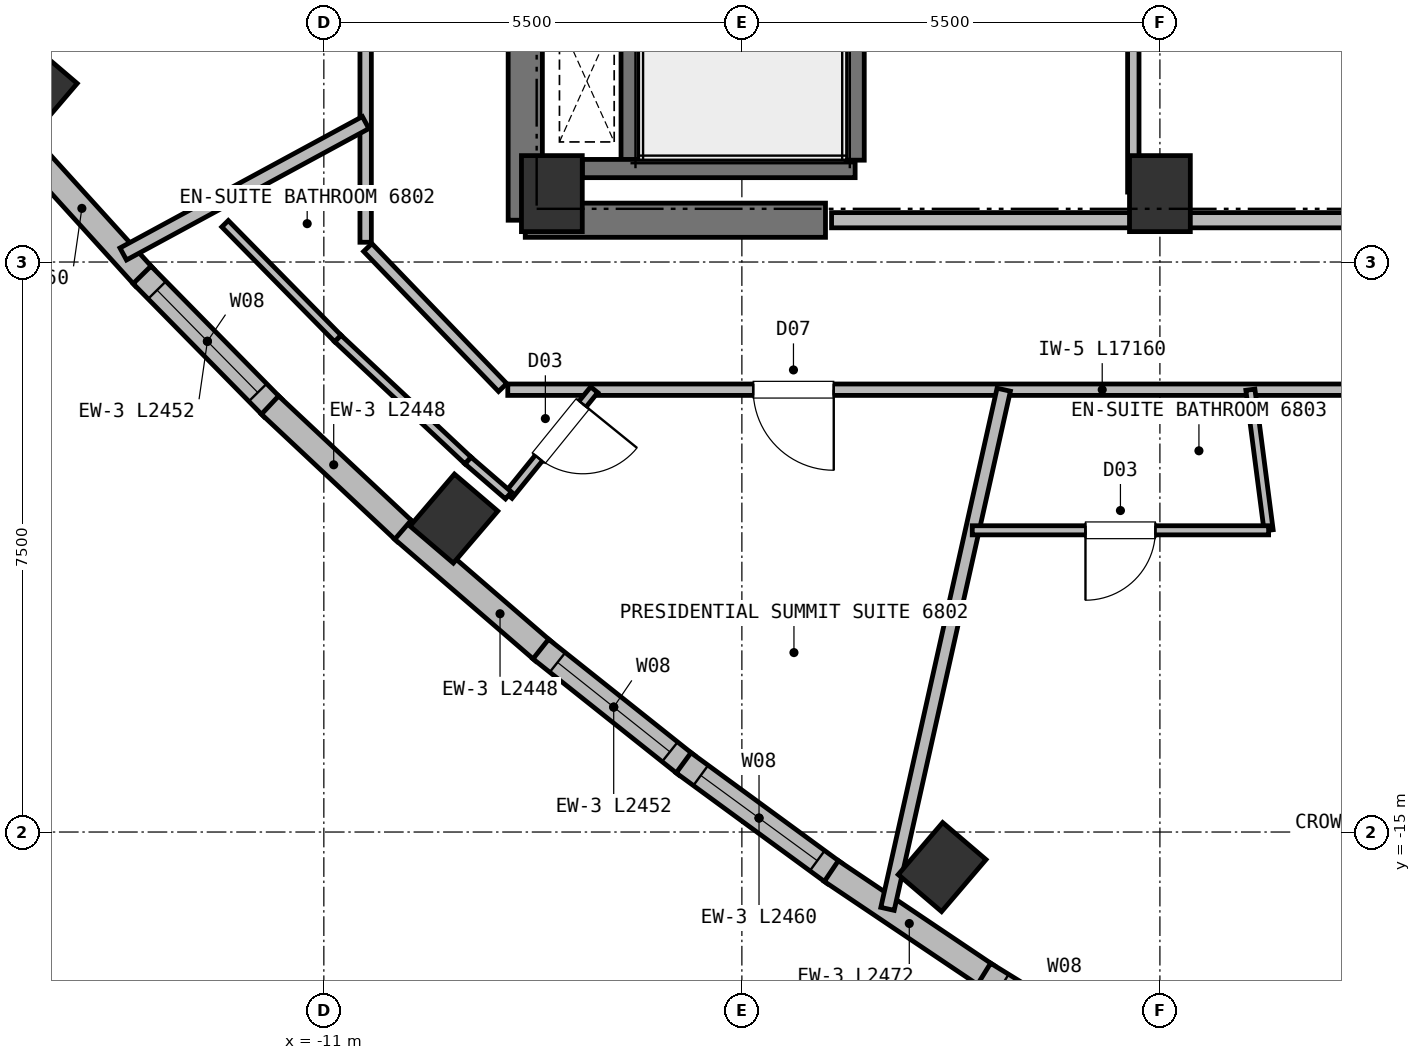
"""IFC4 building model, lengths in metres.
Left out: names, types, materials, properties, quantities, classifications, styles, units other than length and angle.
Written with IfcOpenShell. Run it as: python <this file> out.ifc"""

import sys

from ifc_helpers import new_model, si_unit, direction, frame, frame_2d, origin, origin_2d, place, context, subcontext, project, spatial, rectangle, extrude, element, fill, save


model = new_model("IFC4")
c1 = context("Model", 3, precision=1e-05, world=origin(), true_north=direction((0.0, 1.0)))
c2 = subcontext(c1, "Body", "Model", "MODEL_VIEW")
j1 = project(units=[si_unit("LENGTHUNIT", "METRE"), si_unit("PLANEANGLEUNIT", "RADIAN")], contexts=[c1])
p1 = place(None, origin())
s1 = spatial("IfcSite", under=j1, at=p1, CompositionType="ELEMENT")
p2 = place(p1, origin())
s2 = spatial("IfcBuilding", under=s1, at=p2, CompositionType="ELEMENT")
p3 = place(p2, frame((0.0, 0.0, 260.2)))
s3 = spatial("IfcBuildingStorey", under=s2, at=p3, CompositionType="ELEMENT", Elevation=260.2)
for number, where, z_axis, x_axis in (
    (1, (-8.0, -6.6, 0.0), (0.0, 0.0, 1.0), (1.0, 0.0, 0.0)),
    (2, (0.0, -6.6, 0.0), (0.0, 0.0, 1.0), (1.0, 0.0, 0.0)),
):
    element("IfcColumn", number, at=place(p3, frame(where, z_axis=z_axis, x_axis=x_axis)), inside=s3, PredefinedType="COLUMN", context=c2, shape_type="SweptSolid", body=[
        extrude(rectangle(XDim=0.8, YDim=1.0, at=origin_2d()), origin(), (0.0, 0.0, 1.0), 4.2),
    ])
p4 = place(p3, frame((-8.35, -6.95, 0.0), z_axis=(0.0, 0.0, 1.0), x_axis=(1.0, 0.0, 0.0)))
e3 = element("IfcWall", 3, at=p4, inside=s3, PredefinedType="SHEAR", context=c2, shape_type="SweptSolid", body=[
    extrude(rectangle(XDim=3.95, YDim=0.45, at=frame_2d((1.975, 0.0))), origin(), (0.0, 0.0, 1.0), 3.95),
])
p5 = place(p3, frame((-8.35, -6.95, 0.0), z_axis=(0.0, 0.0, 1.0), x_axis=(0.0, 1.0, 0.0)))
e4 = element("IfcWall", 4, at=p5, inside=s3, PredefinedType="SHEAR", context=c2, shape_type="SweptSolid", body=[
    extrude(rectangle(XDim=8.1, YDim=0.45, at=frame_2d((4.05, 0.0))), origin(), (0.0, 0.0, 1.0), 3.95),
])
for number, where, z_axis, x_axis in (
    (5, (-14.823, -5.249, 0.0), (0.0, 0.0, 1.0), (-0.76, 0.649, 0.0)),
    (6, (-9.289, -10.876, 0.0), (0.0, 0.0, 1.0), (-0.76, 0.649, 0.0)),
    (7, (-2.865, -15.461, 0.0), (0.0, 0.0, 1.0), (-0.76, 0.649, 0.0)),
):
    element("IfcColumn", number, at=place(p3, frame(where, z_axis=z_axis, x_axis=x_axis)), inside=s3, PredefinedType="COLUMN", context=c2, shape_type="SweptSolid", body=[
        extrude(rectangle(XDim=0.75, YDim=0.9, at=origin_2d()), origin(), (0.0, 0.0, 1.0), 4.2),
    ])
p6 = place(p3, frame((-13.357, -7.705, 0.0), z_axis=(0.0, 0.0, 1.0), x_axis=(-0.671827602416, 0.740707548653, 0.0)))
e8 = element("IfcWall", 8, at=p6, inside=s3, PredefinedType="SOLIDWALL", context=c2, shape_type="SweptSolid", body=[
    extrude(rectangle(XDim=2.46, YDim=0.33, at=frame_2d((1.23, 0.0))), origin(), (0.0, 0.0, 1.0), 3.95),
])
p7 = place(p3, frame((-11.672, -9.417, 0.0), z_axis=(0.0, 0.0, 1.0), x_axis=(-0.701107893647, 0.713055202257, 0.0)))
e9 = element("IfcWall", 9, at=p7, inside=s3, PredefinedType="SOLIDWALL", context=c2, shape_type="SweptSolid", body=[
    extrude(rectangle(XDim=2.452, YDim=0.33, at=frame_2d((1.226, 0.0))), origin(), (0.0, 0.0, 1.0), 3.95),
])
p8 = place(p7, frame((0.281, 0.0, 0.72)))
e10 = element("IfcOpeningElement", 10, at=p8, cuts=e9, PredefinedType="OPENING", context=c2, shape_type="SweptSolid", body=[
    extrude(rectangle(XDim=1.89, YDim=2.1, at=frame_2d((0.945, 1.05))), frame((0.0, 0.175, 0.0), z_axis=(0.0, -1.0, 0.0), x_axis=(1.0, 0.0, 0.0)), (0.0, 0.0, 1.0), 0.35),
])
p9 = place(p3, frame((-9.922, -11.057, 0.0), z_axis=(0.0, 0.0, 1.0), x_axis=(-0.72943145169, 0.68405391402, 0.0)))
e11 = element("IfcWall", 11, at=p9, inside=s3, PredefinedType="SOLIDWALL", context=c2, shape_type="SweptSolid", body=[
    extrude(rectangle(XDim=2.448, YDim=0.33, at=frame_2d((1.224, 0.0))), origin(), (0.0, 0.0, 1.0), 3.95),
])
p10 = place(p3, frame((-8.107, -12.625, 0.0), z_axis=(0.0, 0.0, 1.0), x_axis=(-0.756596491388, 0.653882060634, 0.0)))
e12 = element("IfcWall", 12, at=p10, inside=s3, PredefinedType="SOLIDWALL", context=c2, shape_type="SweptSolid", body=[
    extrude(rectangle(XDim=2.448, YDim=0.33, at=frame_2d((1.224, 0.0))), origin(), (0.0, 0.0, 1.0), 3.95),
])
p11 = place(p3, frame((-6.227, -14.12, 0.0), z_axis=(0.0, 0.0, 1.0), x_axis=(-0.782430159528, 0.622738344299, 0.0)))
e13 = element("IfcWall", 13, at=p11, inside=s3, PredefinedType="SOLIDWALL", context=c2, shape_type="SweptSolid", body=[
    extrude(rectangle(XDim=2.452, YDim=0.33, at=frame_2d((1.226, 0.0))), origin(), (0.0, 0.0, 1.0), 3.95),
])
p12 = place(p11, frame((0.281, 0.0, 0.72)))
e14 = element("IfcOpeningElement", 14, at=p12, cuts=e13, PredefinedType="OPENING", context=c2, shape_type="SweptSolid", body=[
    extrude(rectangle(XDim=1.89, YDim=2.1, at=frame_2d((0.945, 1.05))), frame((0.0, 0.175, 0.0), z_axis=(0.0, -1.0, 0.0), x_axis=(1.0, 0.0, 0.0)), (0.0, 0.0, 1.0), 0.35),
])
p13 = place(p3, frame((-4.282, -15.543, 0.0), z_axis=(0.0, 0.0, 1.0), x_axis=(-0.806878025258, 0.59071808196, 0.0)))
e15 = element("IfcWall", 15, at=p13, inside=s3, PredefinedType="SOLIDWALL", context=c2, shape_type="SweptSolid", body=[
    extrude(rectangle(XDim=2.46, YDim=0.33, at=frame_2d((1.23, 0.0))), origin(), (0.0, 0.0, 1.0), 3.95),
])
p14 = place(p13, frame((0.28, 0.0, 0.72)))
e16 = element("IfcOpeningElement", 16, at=p14, cuts=e15, PredefinedType="OPENING", context=c2, shape_type="SweptSolid", body=[
    extrude(rectangle(XDim=1.9, YDim=2.1, at=frame_2d((0.95, 1.05))), frame((0.0, 0.175, 0.0), z_axis=(0.0, -1.0, 0.0), x_axis=(1.0, 0.0, 0.0)), (0.0, 0.0, 1.0), 0.35),
])
p15 = place(p3, frame((-2.272, -16.894, 0.0), z_axis=(0.0, 0.0, 1.0), x_axis=(-0.829748723079, 0.558137130594, 0.0)))
e17 = element("IfcWall", 17, at=p15, inside=s3, PredefinedType="SOLIDWALL", context=c2, shape_type="SweptSolid", body=[
    extrude(rectangle(XDim=2.472, YDim=0.33, at=frame_2d((1.236, 0.0))), origin(), (0.0, 0.0, 1.0), 3.95),
])
p16 = place(p3, frame((-0.197, -18.172, 0.0), z_axis=(0.0, 0.0, 1.0), x_axis=(-0.851175986277, 0.524880405792, 0.0)))
e18 = element("IfcWall", 18, at=p16, inside=s3, PredefinedType="SOLIDWALL", context=c2, shape_type="SweptSolid", body=[
    extrude(rectangle(XDim=2.487, YDim=0.33, at=frame_2d((1.244, 0.0))), origin(), (0.0, 0.0, 1.0), 3.95),
])
p17 = place(p16, frame((0.279, 0.0, 0.72)))
e19 = element("IfcOpeningElement", 19, at=p17, cuts=e18, PredefinedType="OPENING", context=c2, shape_type="SweptSolid", body=[
    extrude(rectangle(XDim=1.93, YDim=2.1, at=frame_2d((0.965, 1.05))), frame((0.0, 0.175, 0.0), z_axis=(0.0, -1.0, 0.0), x_axis=(1.0, 0.0, 0.0)), (0.0, 0.0, 1.0), 0.35),
])
p18 = place(p3, frame((-6.97, -6.16, 0.0), z_axis=(0.0, 0.0, 1.0), x_axis=(0.0, 1.0, 0.0)))
e20 = element("IfcWall", 20, at=p18, inside=s3, PredefinedType="SHEAR", context=c2, shape_type="SweptSolid", body=[
    extrude(rectangle(XDim=7.22, YDim=0.24, at=frame_2d((3.61, 0.0))), origin(), (0.0, 0.0, 1.0), 3.95),
])
p19 = place(p3, frame((-7.6, -6.27, 0.0), z_axis=(0.0, 0.0, 1.0), x_axis=(1.0, 0.0, 0.0)))
e21 = element("IfcWall", 21, at=p19, inside=s3, PredefinedType="SHEAR", context=c2, shape_type="SweptSolid", body=[
    extrude(rectangle(XDim=3.59, YDim=0.24, at=frame_2d((1.795, 0.0))), origin(), (0.0, 0.0, 1.0), 3.95),
])
p20 = place(p3, frame((-4.01, -6.16, 0.0), z_axis=(0.0, 0.0, 1.0), x_axis=(0.0, 1.0, 0.0)))
e22 = element("IfcWall", 22, at=p20, inside=s3, PredefinedType="SHEAR", context=c2, shape_type="SweptSolid", body=[
    extrude(rectangle(XDim=7.22, YDim=0.24, at=frame_2d((3.61, 0.0))), origin(), (0.0, 0.0, 1.0), 3.95),
])
p21 = place(p3, frame((-4.32, -6.95, 0.0), z_axis=(0.0, 0.0, 1.0), x_axis=(1.0, 0.0, 0.0)))
e23 = element("IfcWall", 23, at=p21, inside=s3, PredefinedType="PARTITIONING", context=c2, shape_type="SweptSolid", body=[
    extrude(rectangle(XDim=8.64, YDim=0.2, at=frame_2d((4.32, 0.0))), origin(), (0.0, 0.0, 1.0), 3.95),
])
p22 = place(p3, frame((-0.35, -6.58, 0.0), z_axis=(0.0, 0.0, 1.0), x_axis=(0.0, 1.0, 0.0)))
e24 = element("IfcWall", 24, at=p22, inside=s3, PredefinedType="PARTITIONING", context=c2, shape_type="SweptSolid", body=[
    extrude(rectangle(XDim=4.61, YDim=0.15, at=frame_2d((2.305, 0.0))), origin(), (0.0, 0.0, 1.0), 3.95),
])
p23 = place(p3, frame((8.58, -9.18, 0.0), z_axis=(0.0, 0.0, 1.0), x_axis=(-1.0, 0.0, 0.0)))
e25 = element("IfcWall", 25, at=p23, inside=s3, PredefinedType="PARTITIONING", context=c2, shape_type="SweptSolid", body=[
    extrude(rectangle(XDim=17.16, YDim=0.15, at=frame_2d((8.58, 0.0))), origin(), (0.0, 0.0, 1.0), 3.66),
])
p24 = place(p23, frame((12.871, 0.0, 0.0)))
e26 = element("IfcOpeningElement", 26, at=p24, cuts=e25, PredefinedType="OPENING", context=c2, shape_type="SweptSolid", body=[
    extrude(rectangle(XDim=1.06, YDim=2.15, at=frame_2d((0.53, 1.075))), frame((0.0, 0.085, 0.0), z_axis=(0.0, -1.0, 0.0), x_axis=(1.0, 0.0, 0.0)), (0.0, 0.0, 1.0), 0.17),
])
p25 = place(p23, frame((1.186, 0.0, 0.0)))
e27 = element("IfcOpeningElement", 27, at=p25, cuts=e25, PredefinedType="OPENING", context=c2, shape_type="SweptSolid", body=[
    extrude(rectangle(XDim=1.0, YDim=2.15, at=frame_2d((0.5, 1.075))), frame((0.0, 0.085, 0.0), z_axis=(0.0, -1.0, 0.0), x_axis=(1.0, 0.0, 0.0)), (0.0, 0.0, 1.0), 0.17),
])
p26 = place(p23, frame((4.747, 0.0, 0.0)))
e28 = element("IfcOpeningElement", 28, at=p26, cuts=e25, PredefinedType="OPENING", context=c2, shape_type="SweptSolid", body=[
    extrude(rectangle(XDim=1.06, YDim=2.15, at=frame_2d((0.53, 1.075))), frame((0.0, 0.085, 0.0), z_axis=(0.0, -1.0, 0.0), x_axis=(1.0, 0.0, 0.0)), (0.0, 0.0, 1.0), 0.17),
])
p27 = place(p3, frame((-10.45, -7.24, 0.0), z_axis=(0.0, 0.0, 1.0), x_axis=(0.0, 1.0, 0.0)))
e29 = element("IfcWall", 29, at=p27, inside=s3, PredefinedType="PARTITIONING", context=c2, shape_type="SweptSolid", body=[
    extrude(rectangle(XDim=9.63, YDim=0.15, at=frame_2d((4.815, 0.0))), origin(), (0.0, 0.0, 1.0), 3.95),
])
p28 = place(p27, frame((3.043, 0.0, 0.0)))
e30 = element("IfcOpeningElement", 30, at=p28, cuts=e29, PredefinedType="OPENING", context=c2, shape_type="SweptSolid", body=[
    extrude(rectangle(XDim=1.06, YDim=2.15, at=frame_2d((0.53, 1.075))), frame((0.0, 0.085, 0.0), z_axis=(0.0, -1.0, 0.0), x_axis=(1.0, 0.0, 0.0)), (0.0, 0.0, 1.0), 0.17),
])
p29 = place(p3, frame((-8.648, -9.151, 0.0), z_axis=(0.0, 0.0, 1.0), x_axis=(-0.693764562202, 0.720201869085, 0.0)))
e31 = element("IfcWall", 31, at=p29, inside=s3, PredefinedType="PARTITIONING", context=c2, shape_type="SweptSolid", body=[
    extrude(rectangle(XDim=2.558, YDim=0.15, at=frame_2d((1.279, 0.0))), origin(), (0.0, 0.0, 1.0), 3.95),
])
p30 = place(p3, frame((-10.45, -5.665, 0.0), z_axis=(0.0, 0.0, 1.0), x_axis=(-0.87913221744, -0.476577951922, 0.0)))
e32 = element("IfcWall", 32, at=p30, inside=s3, PredefinedType="PARTITIONING", context=c2, shape_type="SweptSolid", body=[
    extrude(rectangle(XDim=3.628, YDim=0.18, at=frame_2d((1.814, 0.0))), origin(), (0.0, 0.0, 1.0), 3.95),
])
p31 = place(p3, frame((-7.443, -9.18, 0.0), z_axis=(0.0, 0.0, 1.0), x_axis=(-0.629750844472, -0.776797189675, 0.0)))
e33 = element("IfcWall", 33, at=p31, inside=s3, PredefinedType="PARTITIONING", context=c2, shape_type="SweptSolid", body=[
    extrude(rectangle(XDim=1.792, YDim=0.12, at=frame_2d((0.896, 0.0))), origin(), (0.0, 0.0, 1.0), 3.95),
])
p32 = place(p31, frame((0.24, 0.0, 0.0)))
e34 = element("IfcOpeningElement", 34, at=p32, cuts=e33, PredefinedType="OPENING", context=c2, shape_type="SweptSolid", body=[
    extrude(rectangle(XDim=0.92, YDim=2.1, at=frame_2d((0.46, 1.05))), frame((0.0, 0.07, 0.0), z_axis=(0.0, -1.0, 0.0), x_axis=(1.0, 0.0, 0.0)), (0.0, 0.0, 1.0), 0.14),
])
p33 = place(p3, frame((-9.104, -10.111, 0.0), z_axis=(0.0, 0.0, 1.0), x_axis=(0.756534614859, -0.653953650132, 0.0)))
e35 = element("IfcWall", 35, at=p33, inside=s3, PredefinedType="PARTITIONING", context=c2, shape_type="SweptSolid", body=[
    extrude(rectangle(XDim=0.705, YDim=0.12, at=frame_2d((0.352, 0.0))), origin(), (0.0, 0.0, 1.0), 3.95),
])
p34 = place(p3, frame((-10.816, -8.505, 0.0), z_axis=(0.0, 0.0, 1.0), x_axis=(0.729465847855, -0.684017234295, 0.0)))
e36 = element("IfcWall", 36, at=p34, inside=s3, PredefinedType="PARTITIONING", context=c2, shape_type="SweptSolid", body=[
    extrude(rectangle(XDim=2.347, YDim=0.12, at=frame_2d((1.174, 0.0))), origin(), (0.0, 0.0, 1.0), 3.95),
])
p35 = place(p3, frame((-12.3, -6.996, 0.0), z_axis=(0.0, 0.0, 1.0), x_axis=(0.701139951814, -0.713023679811, 0.0)))
e37 = element("IfcWall", 37, at=p35, inside=s3, PredefinedType="PARTITIONING", context=c2, shape_type="SweptSolid", body=[
    extrude(rectangle(XDim=2.116, YDim=0.12, at=frame_2d((1.058, 0.0))), origin(), (0.0, 0.0, 1.0), 3.95),
])
p36 = place(p3, frame((-2.055, -9.18, 0.0), z_axis=(0.0, 0.0, 1.0), x_axis=(-0.218433184148, -0.97585190683, 0.0)))
e38 = element("IfcWall", 38, at=p36, inside=s3, PredefinedType="PARTITIONING", context=c2, shape_type="SweptSolid", body=[
    extrude(rectangle(XDim=7.0, YDim=0.18, at=frame_2d((3.5, 0.0))), origin(), (0.0, 0.0, 1.0), 3.95),
])
p37 = place(p3, frame((1.19, -9.18, 0.0), z_axis=(0.0, 0.0, 1.0), x_axis=(0.128639829388, -0.991691380569, 0.0)))
e39 = element("IfcWall", 39, at=p37, inside=s3, PredefinedType="PARTITIONING", context=c2, shape_type="SweptSolid", body=[
    extrude(rectangle(XDim=1.865, YDim=0.12, at=frame_2d((0.933, 0.0))), origin(), (0.0, 0.0, 1.0), 3.95),
])
p38 = place(p3, frame((1.43, -11.03, 0.0), z_axis=(0.0, 0.0, 1.0), x_axis=(-1.0, 0.0, 0.0)))
e40 = element("IfcWall", 40, at=p38, inside=s3, PredefinedType="PARTITIONING", context=c2, shape_type="SweptSolid", body=[
    extrude(rectangle(XDim=3.899, YDim=0.12, at=frame_2d((1.95, 0.0))), origin(), (0.0, 0.0, 1.0), 3.66),
])
p39 = place(p38, frame((1.49, 0.0, 0.0)))
e41 = element("IfcOpeningElement", 41, at=p39, cuts=e40, PredefinedType="OPENING", context=c2, shape_type="SweptSolid", body=[
    extrude(rectangle(XDim=0.92, YDim=2.1, at=frame_2d((0.46, 1.05))), frame((0.0, 0.07, 0.0), z_axis=(0.0, -1.0, 0.0), x_axis=(1.0, 0.0, 0.0)), (0.0, 0.0, 1.0), 0.14),
])
p40 = place(p8, origin())
e42 = element("IfcWindow", 42, at=p40, inside=s3, PartitioningType="SINGLE_PANEL", PredefinedType="WINDOW", context=c2, shape_type="SweptSolid", body=[
    extrude(rectangle(XDim=1.89, YDim=2.1, at=frame_2d((0.945, 1.05))), frame((0.0, 0.03, 0.0), z_axis=(0.0, -1.0, 0.0), x_axis=(1.0, 0.0, 0.0)), (0.0, 0.0, 1.0), 0.06),
])
fill(e10, e42)
p41 = place(p12, origin())
e43 = element("IfcWindow", 43, at=p41, inside=s3, PartitioningType="SINGLE_PANEL", PredefinedType="WINDOW", context=c2, shape_type="SweptSolid", body=[
    extrude(rectangle(XDim=1.89, YDim=2.1, at=frame_2d((0.945, 1.05))), frame((0.0, 0.03, 0.0), z_axis=(0.0, -1.0, 0.0), x_axis=(1.0, 0.0, 0.0)), (0.0, 0.0, 1.0), 0.06),
])
fill(e14, e43)
p42 = place(p14, origin())
e44 = element("IfcWindow", 44, at=p42, inside=s3, PartitioningType="SINGLE_PANEL", PredefinedType="WINDOW", context=c2, shape_type="SweptSolid", body=[
    extrude(rectangle(XDim=1.9, YDim=2.1, at=frame_2d((0.95, 1.05))), frame((0.0, 0.03, 0.0), z_axis=(0.0, -1.0, 0.0), x_axis=(1.0, 0.0, 0.0)), (0.0, 0.0, 1.0), 0.06),
])
fill(e16, e44)
p43 = place(p32, origin())
e45 = element("IfcDoor", 45, at=p43, inside=s3, OperationType="SINGLE_SWING_LEFT", PredefinedType="DOOR", context=c2, shape_type="SweptSolid", body=[
    extrude(rectangle(XDim=0.92, YDim=2.1, at=frame_2d((0.46, 1.05))), frame((0.0, 0.025, 0.0), z_axis=(0.0, -1.0, 0.0), x_axis=(1.0, 0.0, 0.0)), (0.0, 0.0, 1.0), 0.05),
])
fill(e34, e45)
p44 = place(p39, origin())
e46 = element("IfcDoor", 46, at=p44, inside=s3, OperationType="SINGLE_SWING_RIGHT", PredefinedType="DOOR", context=c2, shape_type="SweptSolid", body=[
    extrude(rectangle(XDim=0.92, YDim=2.1, at=frame_2d((0.46, 1.05))), frame((0.0, 0.025, 0.0), z_axis=(0.0, -1.0, 0.0), x_axis=(1.0, 0.0, 0.0)), (0.0, 0.0, 1.0), 0.05),
])
fill(e41, e46)
p45 = place(p24, origin())
e47 = element("IfcDoor", 47, at=p45, inside=s3, OperationType="SINGLE_SWING_LEFT", PredefinedType="DOOR", context=c2, shape_type="SweptSolid", body=[
    extrude(rectangle(XDim=1.06, YDim=2.15, at=frame_2d((0.53, 1.075))), frame((0.0, 0.025, 0.0), z_axis=(0.0, -1.0, 0.0), x_axis=(1.0, 0.0, 0.0)), (0.0, 0.0, 1.0), 0.05),
])
fill(e26, e47)
save(model, sys.argv[1])
